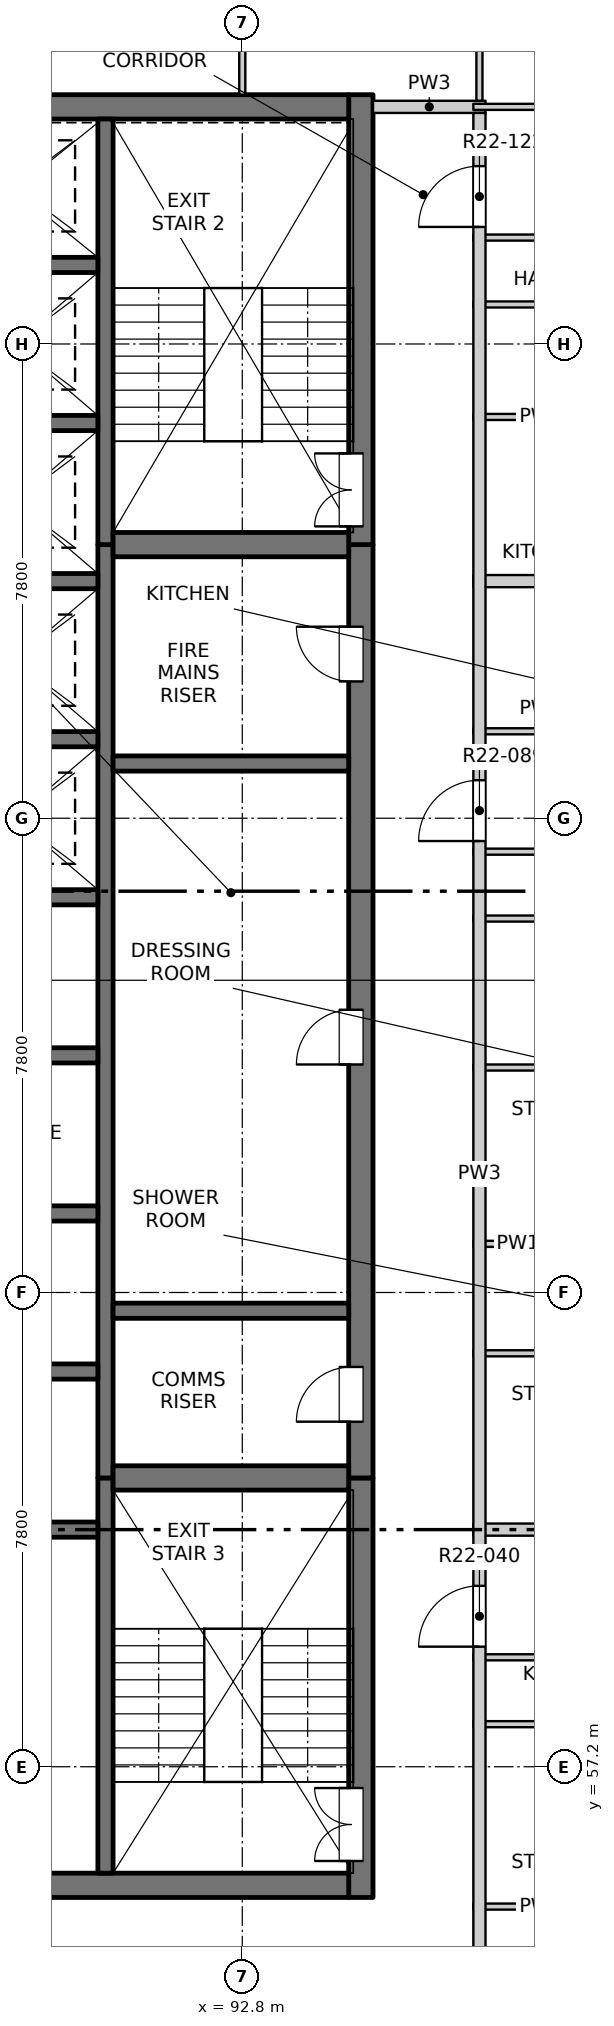
"""IFC4 building model, lengths in metres.
Left out: names, types, materials, properties, quantities, classifications, styles, units other than length and angle.
Written with IfcOpenShell. Run it as: python <this file> out.ifc"""

import sys

from ifc_helpers import new_model, si_unit, direction, frame, frame_2d, origin, place, context, subcontext, project, spatial, rectangle, extrude, element, fill, save


model = new_model("IFC4")
c1 = context("Model", 3, precision=1e-05, world=origin(), true_north=direction((0.0, 1.0)))
c2 = subcontext(c1, "Body", "Model", "MODEL_VIEW")
j1 = project(units=[si_unit("LENGTHUNIT", "METRE"), si_unit("PLANEANGLEUNIT", "RADIAN")], contexts=[c1])
p1 = place(None, origin())
s1 = spatial("IfcSite", under=j1, at=p1, CompositionType="ELEMENT")
p2 = place(p1, origin())
s2 = spatial("IfcBuilding", under=s1, at=p2, CompositionType="ELEMENT")
p3 = place(p2, frame((0.0, 0.0, 224.5)))
s3 = spatial("IfcBuildingStorey", under=s2, at=p3, CompositionType="ELEMENT", Elevation=224.5)
p4 = place(p3, frame((94.75, 55.05, -0.25), z_axis=(0.0, 0.0, 1.0), x_axis=(0.0, 1.0, 0.0)))
e1 = element("IfcWall", 1, at=p4, inside=s3, PredefinedType="SOLIDWALL", context=c2, shape_type="SweptSolid", body=[
    extrude(rectangle(XDim=6.9, YDim=0.4, at=frame_2d((3.45, 0.0))), origin(), (0.0, 0.0, 1.0), 3.4),
])
p5 = place(p4, frame((0.6, 0.0, 0.25)))
e2 = element("IfcOpeningElement", 2, at=p5, cuts=e1, PredefinedType="OPENING", context=c2, shape_type="SweptSolid", body=[
    extrude(rectangle(XDim=1.2, YDim=2.1, at=frame_2d((0.6, 1.05))), frame((0.0, 0.21, 0.0), z_axis=(0.0, -1.0, 0.0), x_axis=(1.0, 0.0, 0.0)), (0.0, 0.0, 1.0), 0.42),
])
p6 = place(p3, frame((94.75, 61.95, -0.25), z_axis=(0.0, 0.0, 1.0), x_axis=(0.0, 1.0, 0.0)))
e3 = element("IfcWall", 3, at=p6, inside=s3, PredefinedType="SOLIDWALL", context=c2, shape_type="SweptSolid", body=[
    extrude(rectangle(XDim=15.35, YDim=0.4, at=frame_2d((7.675, 0.0))), origin(), (0.0, 0.0, 1.0), 3.4),
])
p7 = place(p6, frame((0.925, 0.0, 0.25)))
e4 = element("IfcOpeningElement", 4, at=p7, cuts=e3, PredefinedType="OPENING", context=c2, shape_type="SweptSolid", body=[
    extrude(rectangle(XDim=0.9, YDim=2.1, at=frame_2d((0.45, 1.05))), frame((0.0, 0.21, 0.0), z_axis=(0.0, -1.0, 0.0), x_axis=(1.0, 0.0, 0.0)), (0.0, 0.0, 1.0), 0.42),
])
p8 = place(p6, frame((6.8, 0.0, 0.25)))
e5 = element("IfcOpeningElement", 5, at=p8, cuts=e3, PredefinedType="OPENING", context=c2, shape_type="SweptSolid", body=[
    extrude(rectangle(XDim=0.9, YDim=2.1, at=frame_2d((0.45, 1.05))), frame((0.0, 0.21, 0.0), z_axis=(0.0, -1.0, 0.0), x_axis=(1.0, 0.0, 0.0)), (0.0, 0.0, 1.0), 0.42),
])
p9 = place(p6, frame((13.1, 0.0, 0.25)))
e6 = element("IfcOpeningElement", 6, at=p9, cuts=e3, PredefinedType="OPENING", context=c2, shape_type="SweptSolid", body=[
    extrude(rectangle(XDim=0.9, YDim=2.1, at=frame_2d((0.45, 1.05))), frame((0.0, 0.21, 0.0), z_axis=(0.0, -1.0, 0.0), x_axis=(1.0, 0.0, 0.0)), (0.0, 0.0, 1.0), 0.42),
])
p10 = place(p3, frame((94.75, 77.3, -0.25), z_axis=(0.0, 0.0, 1.0), x_axis=(0.0, 1.0, 0.0)))
e7 = element("IfcWall", 7, at=p10, inside=s3, PredefinedType="SOLIDWALL", context=c2, shape_type="SweptSolid", body=[
    extrude(rectangle(XDim=7.4, YDim=0.4, at=frame_2d((3.7, 0.0))), origin(), (0.0, 0.0, 1.0), 3.4),
])
p11 = place(p10, frame((0.3, 0.0, 0.25)))
e8 = element("IfcOpeningElement", 8, at=p11, cuts=e7, PredefinedType="OPENING", context=c2, shape_type="SweptSolid", body=[
    extrude(rectangle(XDim=1.2, YDim=2.1, at=frame_2d((0.6, 1.05))), frame((0.0, 0.21, 0.0), z_axis=(0.0, -1.0, 0.0), x_axis=(1.0, 0.0, 0.0)), (0.0, 0.0, 1.0), 0.42),
])
p12 = place(p3, frame((75.45, 55.25, -0.25), z_axis=(0.0, 0.0, 1.0), x_axis=(1.0, 0.0, 0.0)))
e9 = element("IfcWall", 9, at=p12, inside=s3, PredefinedType="SOLIDWALL", context=c2, shape_type="SweptSolid", body=[
    extrude(rectangle(XDim=19.1, YDim=0.4, at=frame_2d((9.55, 0.0))), origin(), (0.0, 0.0, 1.0), 3.4),
])
p13 = place(p12, frame((8.8, 0.0, 0.25)))
e10 = element("IfcOpeningElement", 10, at=p13, cuts=e9, PredefinedType="OPENING", context=c2, shape_type="SweptSolid", body=[
    extrude(rectangle(XDim=1.5, YDim=2.1, at=frame_2d((0.75, 1.05))), frame((0.0, 0.21, 0.0), z_axis=(0.0, -1.0, 0.0), x_axis=(1.0, 0.0, 0.0)), (0.0, 0.0, 1.0), 0.42),
])
p14 = place(p3, frame((75.45, 84.5, -0.25), z_axis=(0.0, 0.0, 1.0), x_axis=(1.0, 0.0, 0.0)))
e11 = element("IfcWall", 11, at=p14, inside=s3, PredefinedType="SOLIDWALL", context=c2, shape_type="SweptSolid", body=[
    extrude(rectangle(XDim=19.1, YDim=0.4, at=frame_2d((9.55, 0.0))), origin(), (0.0, 0.0, 1.0), 3.4),
])
p15 = place(p3, frame((90.55, 55.45, -0.25), z_axis=(0.0, 0.0, 1.0), x_axis=(0.0, 1.0, 0.0)))
e12 = element("IfcWall", 12, at=p15, inside=s3, PredefinedType="SOLIDWALL", context=c2, shape_type="SweptSolid", body=[
    extrude(rectangle(XDim=6.5, YDim=0.25, at=frame_2d((3.25, 0.0))), origin(), (0.0, 0.0, 1.0), 3.4),
])
p16 = place(p3, frame((90.55, 61.95, -0.25), z_axis=(0.0, 0.0, 1.0), x_axis=(0.0, 1.0, 0.0)))
e13 = element("IfcWall", 13, at=p16, inside=s3, PredefinedType="SOLIDWALL", context=c2, shape_type="SweptSolid", body=[
    extrude(rectangle(XDim=15.35, YDim=0.25, at=frame_2d((7.675, 0.0))), origin(), (0.0, 0.0, 1.0), 3.4),
])
p17 = place(p3, frame((90.55, 77.3, -0.25), z_axis=(0.0, 0.0, 1.0), x_axis=(0.0, 1.0, 0.0)))
e14 = element("IfcWall", 14, at=p17, inside=s3, PredefinedType="SOLIDWALL", context=c2, shape_type="SweptSolid", body=[
    extrude(rectangle(XDim=7.0, YDim=0.25, at=frame_2d((3.5, 0.0))), origin(), (0.0, 0.0, 1.0), 3.4),
])
for number, where, z_axis, x_axis in (
    (15, (87.425, 61.1, -0.25), (0.0, 0.0, 1.0), (1.0, 0.0, 0.0)),
    (16, (87.425, 63.7, -0.25), (0.0, 0.0, 1.0), (1.0, 0.0, 0.0)),
    (17, (87.425, 66.3, -0.25), (0.0, 0.0, 1.0), (1.0, 0.0, 0.0)),
    (18, (87.425, 68.9, -0.25), (0.0, 0.0, 1.0), (1.0, 0.0, 0.0)),
    (19, (87.425, 71.5, -0.25), (0.0, 0.0, 1.0), (1.0, 0.0, 0.0)),
    (20, (87.425, 74.1, -0.25), (0.0, 0.0, 1.0), (1.0, 0.0, 0.0)),
    (21, (87.425, 76.7, -0.25), (0.0, 0.0, 1.0), (1.0, 0.0, 0.0)),
    (22, (87.425, 79.3, -0.25), (0.0, 0.0, 1.0), (1.0, 0.0, 0.0)),
    (23, (87.425, 81.9, -0.25), (0.0, 0.0, 1.0), (1.0, 0.0, 0.0)),
):
    element("IfcWall", number, at=place(p3, frame(where, z_axis=z_axis, x_axis=x_axis)), inside=s3, PredefinedType="SOLIDWALL", context=c2, shape_type="SweptSolid", body=[
        extrude(rectangle(XDim=3.0, YDim=0.25, at=frame_2d((1.5, 0.0))), origin(), (0.0, 0.0, 1.0), 3.4),
    ])
p18 = place(p3, frame((90.675, 61.95, -0.25), z_axis=(0.0, 0.0, 1.0), x_axis=(1.0, 0.0, 0.0)))
e24 = element("IfcWall", 24, at=p18, inside=s3, PredefinedType="SOLIDWALL", context=c2, shape_type="SweptSolid", body=[
    extrude(rectangle(XDim=3.875, YDim=0.4, at=frame_2d((1.938, 0.0))), origin(), (0.0, 0.0, 1.0), 3.4),
])
for number, where, z_axis, x_axis in (
    (25, (90.675, 64.7, -0.25), (0.0, 0.0, 1.0), (1.0, 0.0, 0.0)),
    (26, (90.675, 73.7, -0.25), (0.0, 0.0, 1.0), (1.0, 0.0, 0.0)),
):
    element("IfcWall", number, at=place(p3, frame(where, z_axis=z_axis, x_axis=x_axis)), inside=s3, PredefinedType="SOLIDWALL", context=c2, shape_type="SweptSolid", body=[
        extrude(rectangle(XDim=3.875, YDim=0.25, at=frame_2d((1.938, 0.0))), origin(), (0.0, 0.0, 1.0), 3.4),
    ])
p19 = place(p3, frame((90.675, 77.3, -0.25), z_axis=(0.0, 0.0, 1.0), x_axis=(1.0, 0.0, 0.0)))
e27 = element("IfcWall", 27, at=p19, inside=s3, PredefinedType="SOLIDWALL", context=c2, shape_type="SweptSolid", body=[
    extrude(rectangle(XDim=3.875, YDim=0.4, at=frame_2d((1.938, 0.0))), origin(), (0.0, 0.0, 1.0), 3.4),
])
for number, where, z_axis, x_axis in (
    (28, (96.6, 54.9, 0.0), (0.0, 0.0, 1.0), (1.0, 0.0, 0.0)),
    (29, (96.6, 57.9, 0.0), (0.0, 0.0, 1.0), (1.0, 0.0, 0.0)),
    (30, (96.6, 59.0, 0.0), (0.0, 0.0, 1.0), (1.0, 0.0, 0.0)),
):
    element("IfcWall", number, at=place(p3, frame(where, z_axis=z_axis, x_axis=x_axis)), inside=s3, PredefinedType="PARTITIONING", context=c2, shape_type="SweptSolid", body=[
        extrude(rectangle(XDim=2.22, YDim=0.1, at=frame_2d((1.11, 0.0))), origin(), (0.0, 0.0, 1.0), 3.15),
    ])
p20 = place(p3, frame((96.6, 61.1, 0.0), z_axis=(0.0, 0.0, 1.0), x_axis=(1.0, 0.0, 0.0)))
e31 = element("IfcWall", 31, at=p20, inside=s3, PredefinedType="PARTITIONING", context=c2, shape_type="SweptSolid", body=[
    extrude(rectangle(XDim=11.5, YDim=0.2, at=frame_2d((5.75, 0.0))), origin(), (0.0, 0.0, 1.0), 2.55),
])
for number, where, z_axis, x_axis in (
    (32, (96.6, 64.0, 0.0), (0.0, 0.0, 1.0), (1.0, 0.0, 0.0)),
    (33, (96.6, 65.8, 0.0), (0.0, 0.0, 1.0), (1.0, 0.0, 0.0)),
):
    element("IfcWall", number, at=place(p3, frame(where, z_axis=z_axis, x_axis=x_axis)), inside=s3, PredefinedType="PARTITIONING", context=c2, shape_type="SweptSolid", body=[
        extrude(rectangle(XDim=2.22, YDim=0.1, at=frame_2d((1.11, 0.0))), origin(), (0.0, 0.0, 1.0), 3.15),
    ])
p21 = place(p3, frame((96.6, 68.7, 0.0), z_axis=(0.0, 0.0, 1.0), x_axis=(1.0, 0.0, 0.0)))
e34 = element("IfcWall", 34, at=p21, inside=s3, PredefinedType="PARTITIONING", context=c2, shape_type="SweptSolid", body=[
    extrude(rectangle(XDim=2.22, YDim=0.1, at=frame_2d((1.11, 0.0))), origin(), (0.0, 0.0, 1.0), 2.55),
])
for number, where, z_axis, x_axis in (
    (35, (96.6, 71.15, 0.0), (0.0, 0.0, 1.0), (1.0, 0.0, 0.0)),
    (36, (96.6, 72.25, 0.0), (0.0, 0.0, 1.0), (1.0, 0.0, 0.0)),
    (37, (96.6, 74.23, 0.0), (0.0, 0.0, 1.0), (1.0, 0.0, 0.0)),
):
    element("IfcWall", number, at=place(p3, frame(where, z_axis=z_axis, x_axis=x_axis)), inside=s3, PredefinedType="PARTITIONING", context=c2, shape_type="SweptSolid", body=[
        extrude(rectangle(XDim=2.22, YDim=0.1, at=frame_2d((1.11, 0.0))), origin(), (0.0, 0.0, 1.0), 3.15),
    ])
p22 = place(p3, frame((96.6, 76.7, 0.0), z_axis=(0.0, 0.0, 1.0), x_axis=(1.0, 0.0, 0.0)))
e38 = element("IfcWall", 38, at=p22, inside=s3, PredefinedType="PARTITIONING", context=c2, shape_type="SweptSolid", body=[
    extrude(rectangle(XDim=11.5, YDim=0.2, at=frame_2d((5.75, 0.0))), origin(), (0.0, 0.0, 1.0), 2.55),
])
for number, where, z_axis, x_axis in (
    (39, (96.6, 79.4, 0.0), (0.0, 0.0, 1.0), (1.0, 0.0, 0.0)),
    (40, (96.6, 81.25, 0.0), (0.0, 0.0, 1.0), (1.0, 0.0, 0.0)),
    (41, (96.6, 82.35, 0.0), (0.0, 0.0, 1.0), (1.0, 0.0, 0.0)),
):
    element("IfcWall", number, at=place(p3, frame(where, z_axis=z_axis, x_axis=x_axis)), inside=s3, PredefinedType="PARTITIONING", context=c2, shape_type="SweptSolid", body=[
        extrude(rectangle(XDim=2.22, YDim=0.1, at=frame_2d((1.11, 0.0))), origin(), (0.0, 0.0, 1.0), 3.15),
    ])
p23 = place(p3, frame((94.95, 84.5, 0.0), z_axis=(0.0, 0.0, 1.0), x_axis=(1.0, 0.0, 0.0)))
e42 = element("IfcWall", 42, at=p23, inside=s3, PredefinedType="PARTITIONING", context=c2, shape_type="SweptSolid", body=[
    extrude(rectangle(XDim=1.85, YDim=0.2, at=frame_2d((0.925, 0.0))), origin(), (0.0, 0.0, 1.0), 3.15),
])
p24 = place(p3, frame((96.6, 84.5, 0.0), z_axis=(0.0, 0.0, 1.0), x_axis=(1.0, 0.0, 0.0)))
e43 = element("IfcWall", 43, at=p24, inside=s3, PredefinedType="PARTITIONING", context=c2, shape_type="SweptSolid", body=[
    extrude(rectangle(XDim=11.5, YDim=0.1, at=frame_2d((5.75, 0.0))), origin(), (0.0, 0.0, 1.0), 3.15),
])
p25 = place(p24, frame((2.635, 0.0, 0.0)))
e44 = element("IfcOpeningElement", 44, at=p25, cuts=e43, PredefinedType="OPENING", context=c2, shape_type="SweptSolid", body=[
    extrude(rectangle(XDim=0.9, YDim=2.1, at=frame_2d((0.45, 1.05))), frame((0.0, 0.06, 0.0), z_axis=(0.0, -1.0, 0.0), x_axis=(1.0, 0.0, 0.0)), (0.0, 0.0, 1.0), 0.12),
])
p26 = place(p3, frame((92.8, 84.7, 0.0), z_axis=(0.0, 0.0, 1.0), x_axis=(0.0, 1.0, 0.0)))
e45 = element("IfcWall", 45, at=p26, inside=s3, PredefinedType="PARTITIONING", context=c2, shape_type="SweptSolid", body=[
    extrude(rectangle(XDim=3.4, YDim=0.1, at=frame_2d((1.7, 0.0))), origin(), (0.0, 0.0, 1.0), 3.15),
])
p27 = place(p26, frame((1.3, 0.0, 0.0)))
e46 = element("IfcOpeningElement", 46, at=p27, cuts=e45, PredefinedType="OPENING", context=c2, shape_type="SweptSolid", body=[
    extrude(rectangle(XDim=0.9, YDim=2.1, at=frame_2d((0.45, 1.05))), frame((0.0, 0.06, 0.0), z_axis=(0.0, -1.0, 0.0), x_axis=(1.0, 0.0, 0.0)), (0.0, 0.0, 1.0), 0.12),
])
p28 = place(p3, frame((96.7, 49.5, 0.0), z_axis=(0.0, 0.0, 1.0), x_axis=(0.0, 1.0, 0.0)))
e47 = element("IfcWall", 47, at=p28, inside=s3, PredefinedType="PARTITIONING", context=c2, shape_type="SweptSolid", body=[
    extrude(rectangle(XDim=34.9, YDim=0.2, at=frame_2d((17.45, 0.0))), origin(), (0.0, 0.0, 1.0), 3.15),
])
p29 = place(p28, frame((9.675, 0.0, 0.0)))
e48 = element("IfcOpeningElement", 48, at=p29, cuts=e47, PredefinedType="OPENING", context=c2, shape_type="SweptSolid", body=[
    extrude(rectangle(XDim=1.0, YDim=2.1, at=frame_2d((0.5, 1.05))), frame((0.0, 0.11, 0.0), z_axis=(0.0, -1.0, 0.0), x_axis=(1.0, 0.0, 0.0)), (0.0, 0.0, 1.0), 0.22),
])
p30 = place(p28, frame((22.925, 0.0, 0.0)))
e49 = element("IfcOpeningElement", 49, at=p30, cuts=e47, PredefinedType="OPENING", context=c2, shape_type="SweptSolid", body=[
    extrude(rectangle(XDim=1.0, YDim=2.1, at=frame_2d((0.5, 1.05))), frame((0.0, 0.11, 0.0), z_axis=(0.0, -1.0, 0.0), x_axis=(1.0, 0.0, 0.0)), (0.0, 0.0, 1.0), 0.22),
])
p31 = place(p28, frame((33.025, 0.0, 0.0)))
e50 = element("IfcOpeningElement", 50, at=p31, cuts=e47, PredefinedType="OPENING", context=c2, shape_type="SweptSolid", body=[
    extrude(rectangle(XDim=1.0, YDim=2.1, at=frame_2d((0.5, 1.05))), frame((0.0, 0.11, 0.0), z_axis=(0.0, -1.0, 0.0), x_axis=(1.0, 0.0, 0.0)), (0.0, 0.0, 1.0), 0.22),
])
p32 = place(p3, frame((96.7, 84.6, 0.0), z_axis=(0.0, 0.0, 1.0), x_axis=(0.0, 1.0, 0.0)))
e51 = element("IfcWall", 51, at=p32, inside=s3, PredefinedType="PARTITIONING", context=c2, shape_type="SweptSolid", body=[
    extrude(rectangle(XDim=3.5, YDim=0.1, at=frame_2d((1.75, 0.0))), origin(), (0.0, 0.0, 1.0), 3.15),
])
p33 = place(p32, frame((1.4, 0.0, 0.0)))
e52 = element("IfcOpeningElement", 52, at=p33, cuts=e51, PredefinedType="OPENING", context=c2, shape_type="SweptSolid", body=[
    extrude(rectangle(XDim=0.9, YDim=2.1, at=frame_2d((0.45, 1.05))), frame((0.0, 0.06, 0.0), z_axis=(0.0, -1.0, 0.0), x_axis=(1.0, 0.0, 0.0)), (0.0, 0.0, 1.0), 0.12),
])
p34 = place(p5, origin())
e53 = element("IfcDoor", 53, at=p34, inside=s3, OperationType="DOUBLE_DOOR_SINGLE_SWING", PredefinedType="DOOR", context=c2, shape_type="SweptSolid", body=[
    extrude(rectangle(XDim=1.2, YDim=2.1, at=frame_2d((0.6, 1.05))), frame((0.0, 0.185, 0.0), z_axis=(0.0, -1.0, 0.0), x_axis=(1.0, 0.0, 0.0)), (0.0, 0.0, 1.0), 0.05),
])
fill(e2, e53)
p35 = place(p29, origin())
e54 = element("IfcDoor", 54, at=p35, inside=s3, OperationType="SINGLE_SWING_LEFT", PredefinedType="DOOR", context=c2, shape_type="SweptSolid", body=[
    extrude(rectangle(XDim=1.0, YDim=2.1, at=frame_2d((0.5, 1.05))), frame((0.0, 0.025, 0.0), z_axis=(0.0, -1.0, 0.0), x_axis=(1.0, 0.0, 0.0)), (0.0, 0.0, 1.0), 0.05),
])
fill(e48, e54)
p36 = place(p7, origin())
e55 = element("IfcDoor", 55, at=p36, inside=s3, OperationType="SINGLE_SWING_LEFT", PredefinedType="DOOR", context=c2, shape_type="SweptSolid", body=[
    extrude(rectangle(XDim=0.9, YDim=2.1, at=frame_2d((0.45, 1.05))), frame((0.0, 0.185, 0.0), z_axis=(0.0, -1.0, 0.0), x_axis=(1.0, 0.0, 0.0)), (0.0, 0.0, 1.0), 0.05),
])
fill(e4, e55)
p37 = place(p8, origin())
e56 = element("IfcDoor", 56, at=p37, inside=s3, OperationType="SINGLE_SWING_LEFT", PredefinedType="DOOR", context=c2, shape_type="SweptSolid", body=[
    extrude(rectangle(XDim=0.9, YDim=2.1, at=frame_2d((0.45, 1.05))), frame((0.0, 0.185, 0.0), z_axis=(0.0, -1.0, 0.0), x_axis=(1.0, 0.0, 0.0)), (0.0, 0.0, 1.0), 0.05),
])
fill(e5, e56)
p38 = place(p30, origin())
e57 = element("IfcDoor", 57, at=p38, inside=s3, OperationType="SINGLE_SWING_LEFT", PredefinedType="DOOR", context=c2, shape_type="SweptSolid", body=[
    extrude(rectangle(XDim=1.0, YDim=2.1, at=frame_2d((0.5, 1.05))), frame((0.0, 0.025, 0.0), z_axis=(0.0, -1.0, 0.0), x_axis=(1.0, 0.0, 0.0)), (0.0, 0.0, 1.0), 0.05),
])
fill(e49, e57)
p39 = place(p9, origin())
e58 = element("IfcDoor", 58, at=p39, inside=s3, OperationType="SINGLE_SWING_RIGHT", PredefinedType="DOOR", context=c2, shape_type="SweptSolid", body=[
    extrude(rectangle(XDim=0.9, YDim=2.1, at=frame_2d((0.45, 1.05))), frame((0.0, 0.185, 0.0), z_axis=(0.0, -1.0, 0.0), x_axis=(1.0, 0.0, 0.0)), (0.0, 0.0, 1.0), 0.05),
])
fill(e6, e58)
p40 = place(p11, origin())
e59 = element("IfcDoor", 59, at=p40, inside=s3, OperationType="DOUBLE_DOOR_SINGLE_SWING", PredefinedType="DOOR", context=c2, shape_type="SweptSolid", body=[
    extrude(rectangle(XDim=1.2, YDim=2.1, at=frame_2d((0.6, 1.05))), frame((0.0, 0.185, 0.0), z_axis=(0.0, -1.0, 0.0), x_axis=(1.0, 0.0, 0.0)), (0.0, 0.0, 1.0), 0.05),
])
fill(e8, e59)
p41 = place(p31, origin())
e60 = element("IfcDoor", 60, at=p41, inside=s3, OperationType="SINGLE_SWING_LEFT", PredefinedType="DOOR", context=c2, shape_type="SweptSolid", body=[
    extrude(rectangle(XDim=1.0, YDim=2.1, at=frame_2d((0.5, 1.05))), frame((0.0, 0.025, 0.0), z_axis=(0.0, -1.0, 0.0), x_axis=(1.0, 0.0, 0.0)), (0.0, 0.0, 1.0), 0.05),
])
fill(e50, e60)
save(model, sys.argv[1])
